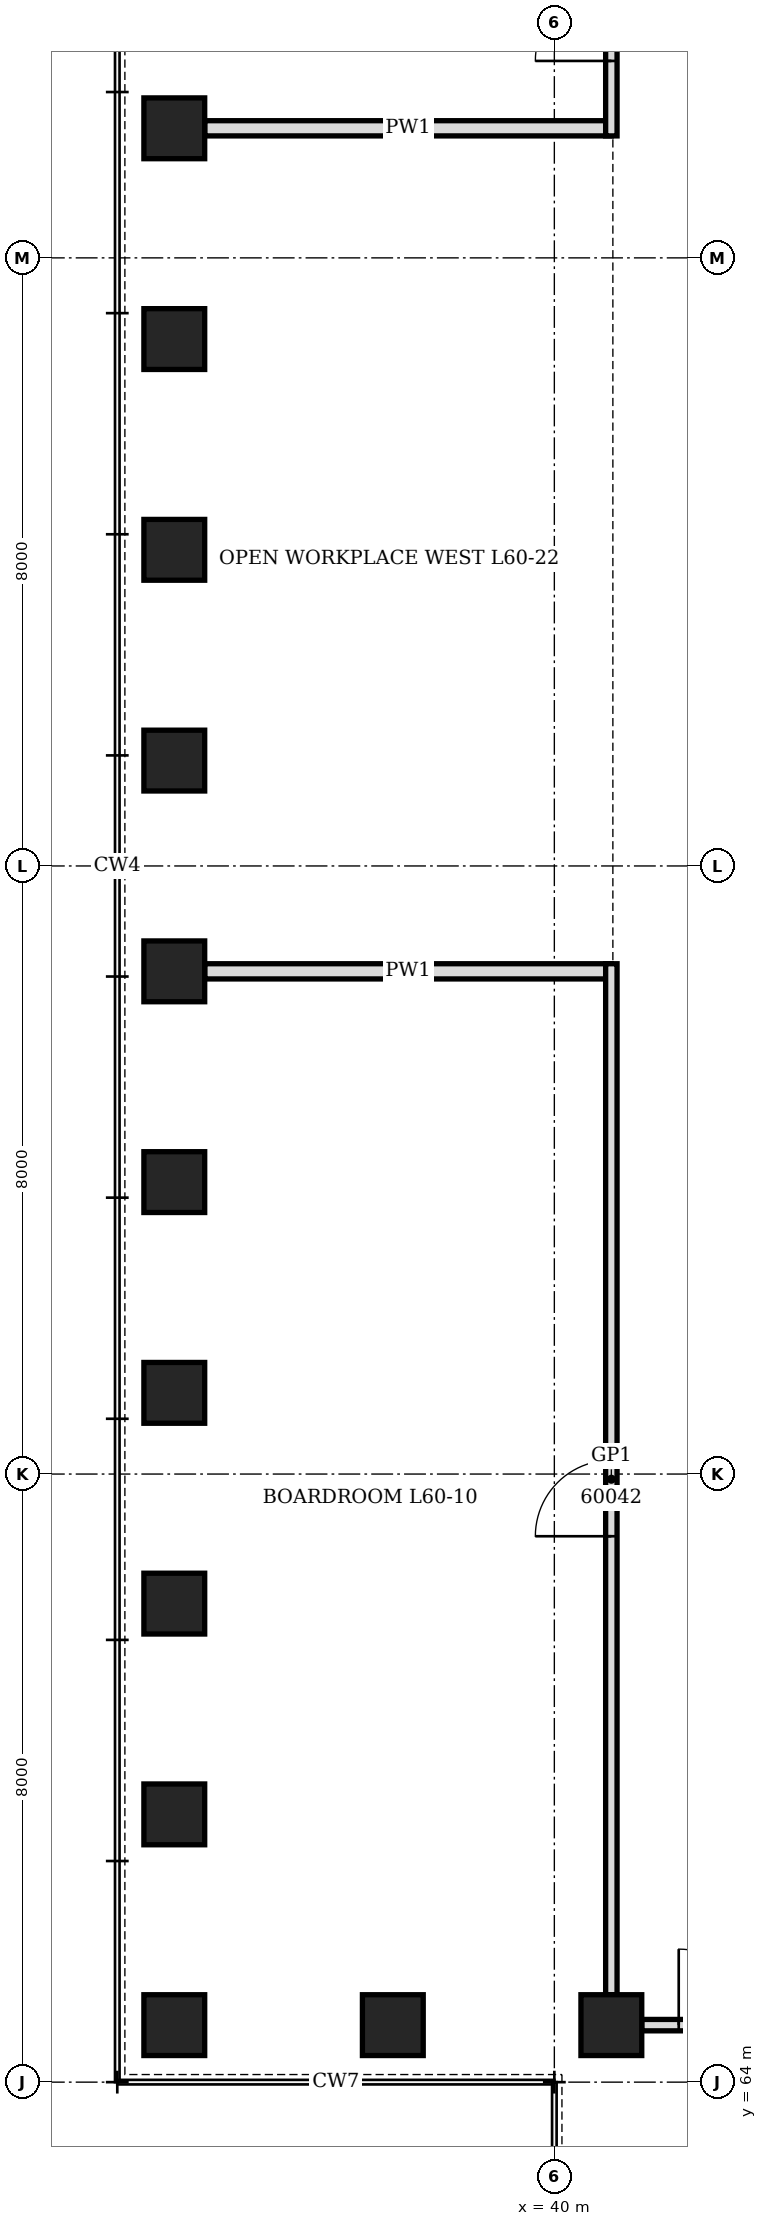
"""IFC4 building model, lengths in metres.
Left out: names, types, materials, properties, quantities, classifications, styles, units other than length and angle.
Written with IfcOpenShell. Run it as: python <this file> out.ifc"""

import sys

from ifc_helpers import new_model, si_unit, direction, frame, frame_2d, origin, origin_2d, place, context, subcontext, project, spatial, rectangle, hollow_rectangle, extrude, element, fill, save


model = new_model("IFC4")
c1 = context("Model", 3, precision=1e-05, world=origin(), true_north=direction((0.0, 1.0)))
c2 = subcontext(c1, "Body", "Model", "MODEL_VIEW")
j1 = project(units=[si_unit("LENGTHUNIT", "METRE"), si_unit("PLANEANGLEUNIT", "RADIAN")], contexts=[c1])
p1 = place(None, origin())
s1 = spatial("IfcSite", under=j1, at=p1, CompositionType="ELEMENT")
p2 = place(p1, origin())
s2 = spatial("IfcBuilding", under=s1, at=p2, CompositionType="ELEMENT")
p3 = place(p2, frame((0.0, 0.0, 267.1)))
s3 = spatial("IfcBuildingStorey", under=s2, at=p3, CompositionType="ELEMENT", Elevation=267.1)
for number, where, z_axis, x_axis in (
    (1, (35.0, 89.705, 0.0), (0.0, 0.0, 1.0), (0.0, 1.0, 0.0)),
    (2, (35.0, 86.932, 0.0), (0.0, 0.0, 1.0), (0.0, 1.0, 0.0)),
    (3, (35.0, 84.159, 0.0), (0.0, 0.0, 1.0), (0.0, 1.0, 0.0)),
    (4, (35.0, 81.386, 0.0), (0.0, 0.0, 1.0), (0.0, 1.0, 0.0)),
    (5, (35.0, 78.614, 0.0), (0.0, 0.0, 1.0), (0.0, 1.0, 0.0)),
    (6, (35.0, 75.841, 0.0), (0.0, 0.0, 1.0), (0.0, 1.0, 0.0)),
    (7, (35.0, 73.068, 0.0), (0.0, 0.0, 1.0), (0.0, 1.0, 0.0)),
    (8, (35.0, 70.295, 0.0), (0.0, 0.0, 1.0), (0.0, 1.0, 0.0)),
    (9, (35.0, 67.523, 0.0), (0.0, 0.0, 1.0), (0.0, 1.0, 0.0)),
    (10, (35.0, 64.75, 0.0), (0.0, 0.0, 1.0), (1.0, 0.0, 0.0)),
    (11, (37.875, 64.75, 0.0), (0.0, 0.0, 1.0), (1.0, 0.0, 0.0)),
    (12, (40.75, 64.75, 0.0), (0.0, 0.0, 1.0), (0.0, 1.0, 0.0)),
):
    element("IfcColumn", number, at=place(p3, frame(where, z_axis=z_axis, x_axis=x_axis)), inside=s3, PredefinedType="COLUMN", context=c2, shape_type="SweptSolid", body=[
        extrude(hollow_rectangle(XDim=0.8, YDim=0.8, WallThickness=0.1, at=origin_2d()), origin(), (0.0, 0.0, 1.0), 4.2),
    ])
for number, where, z_axis, x_axis in (
    (13, (35.4, 78.614, 0.0), (0.0, 0.0, 1.0), (1.0, 0.0, 0.0)),
    (14, (35.4, 89.705, 0.0), (0.0, 0.0, 1.0), (1.0, 0.0, 0.0)),
):
    element("IfcWall", number, at=place(p3, frame(where, z_axis=z_axis, x_axis=x_axis)), inside=s3, PredefinedType="PARTITIONING", context=c2, shape_type="SweptSolid", body=[
        extrude(rectangle(XDim=5.35, YDim=0.2, at=frame_2d((2.675, 0.0))), origin(), (0.0, 0.0, 1.0), 3.428),
    ])
p4 = place(p3, frame((41.15, 64.75, 0.0), z_axis=(0.0, 0.0, 1.0), x_axis=(1.0, 0.0, 0.0)))
e15 = element("IfcWall", 15, at=p4, inside=s3, PredefinedType="PARTITIONING", context=c2, shape_type="SweptSolid", body=[
    extrude(rectangle(XDim=10.791, YDim=0.15, at=frame_2d((5.396, 0.0))), origin(), (0.0, 0.0, 1.0), 4.04),
])
p5 = place(p4, frame((0.486, 0.0, 0.0)))
e16 = element("IfcOpeningElement", 16, at=p5, cuts=e15, PredefinedType="OPENING", context=c2, shape_type="SweptSolid", body=[
    extrude(rectangle(XDim=1.0, YDim=2.1, at=frame_2d((0.5, 1.05))), frame((0.0, 0.085, 0.0), z_axis=(0.0, -1.0, 0.0), x_axis=(1.0, 0.0, 0.0)), (0.0, 0.0, 1.0), 0.17),
])
p6 = place(p4, frame((6.032, 0.0, 0.0)))
e17 = element("IfcOpeningElement", 17, at=p6, cuts=e15, PredefinedType="OPENING", context=c2, shape_type="SweptSolid", body=[
    extrude(rectangle(XDim=1.0, YDim=2.1, at=frame_2d((0.5, 1.05))), frame((0.0, 0.085, 0.0), z_axis=(0.0, -1.0, 0.0), x_axis=(1.0, 0.0, 0.0)), (0.0, 0.0, 1.0), 0.17),
])
p7 = place(p3, frame((40.75, 65.15, 0.0), z_axis=(0.0, 0.0, 1.0), x_axis=(0.0, 1.0, 0.0)))
e18 = element("IfcWall", 18, at=p7, inside=s3, PredefinedType="PARTITIONING", context=c2, shape_type="SweptSolid", body=[
    extrude(rectangle(XDim=13.564, YDim=0.15, at=frame_2d((6.782, 0.0))), origin(), (0.0, 0.0, 1.0), 4.04),
])
p8 = place(p7, frame((6.032, 0.0, 0.0)))
e19 = element("IfcOpeningElement", 19, at=p8, cuts=e18, PredefinedType="OPENING", context=c2, shape_type="SweptSolid", body=[
    extrude(rectangle(XDim=1.0, YDim=2.4, at=frame_2d((0.5, 1.2))), frame((0.0, 0.085, 0.0), z_axis=(0.0, -1.0, 0.0), x_axis=(1.0, 0.0, 0.0)), (0.0, 0.0, 1.0), 0.17),
])
p9 = place(p3, frame((40.75, 89.604, 0.0), z_axis=(0.0, 0.0, 1.0), x_axis=(0.0, 1.0, 0.0)))
e20 = element("IfcWall", 20, at=p9, inside=s3, PredefinedType="PARTITIONING", context=c2, shape_type="SweptSolid", body=[
    extrude(rectangle(XDim=5.246, YDim=0.15, at=frame_2d((2.623, 0.0))), origin(), (0.0, 0.0, 1.0), 4.04),
])
p10 = place(p9, frame((0.986, 0.0, 0.0)))
e21 = element("IfcOpeningElement", 21, at=p10, cuts=e20, PredefinedType="OPENING", context=c2, shape_type="SweptSolid", body=[
    extrude(rectangle(XDim=1.0, YDim=2.1, at=frame_2d((0.5, 1.05))), frame((0.0, 0.085, 0.0), z_axis=(0.0, -1.0, 0.0), x_axis=(1.0, 0.0, 0.0)), (0.0, 0.0, 1.0), 0.17),
])
p11 = place(p5, origin())
e22 = element("IfcDoor", 22, at=p11, inside=s3, OperationType="SINGLE_SWING_LEFT", PredefinedType="DOOR", context=c2, shape_type="SweptSolid", body=[
    extrude(rectangle(XDim=1.0, YDim=2.1, at=frame_2d((0.5, 1.05))), frame((0.0, 0.075, 0.0), z_axis=(0.0, -1.0, 0.0), x_axis=(1.0, 0.0, 0.0)), (0.0, 0.0, 1.0), 0.149),
])
fill(e16, e22)
p12 = place(p8, origin())
e23 = element("IfcDoor", 23, at=p12, inside=s3, OperationType="SINGLE_SWING_RIGHT", PredefinedType="DOOR", context=c2, shape_type="SweptSolid", body=[
    extrude(rectangle(XDim=1.0, YDim=2.4, at=frame_2d((0.5, 1.2))), frame((0.0, 0.075, 0.0), z_axis=(0.0, -1.0, 0.0), x_axis=(1.0, 0.0, 0.0)), (0.0, 0.0, 1.0), 0.149),
])
fill(e19, e23)
p13 = place(p10, origin())
e24 = element("IfcDoor", 24, at=p13, inside=s3, OperationType="SINGLE_SWING_LEFT", PredefinedType="DOOR", context=c2, shape_type="SweptSolid", body=[
    extrude(rectangle(XDim=1.0, YDim=2.1, at=frame_2d((0.5, 1.05))), frame((0.0, 0.075, 0.0), z_axis=(0.0, -1.0, 0.0), x_axis=(1.0, 0.0, 0.0)), (0.0, 0.0, 1.0), 0.149),
])
fill(e21, e24)
save(model, sys.argv[1])
